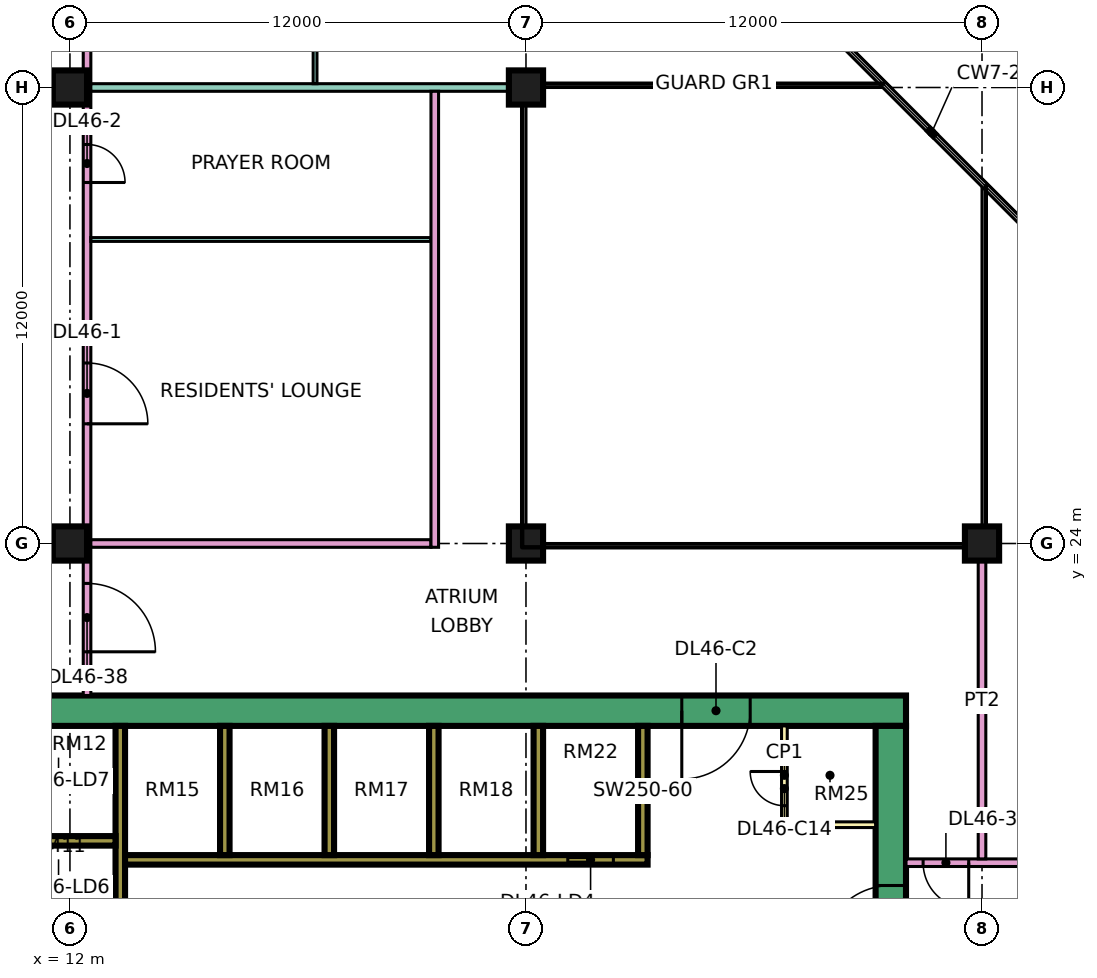
"""IFC4 building model, lengths in metres.
Left out: names, types, materials, properties, quantities, classifications, styles, units other than length and angle.
Written with IfcOpenShell. Run it as: python <this file> out.ifc"""

import sys

from ifc_helpers import new_model, si_unit, direction, frame, frame_2d, origin, origin_2d, place, context, subcontext, project, spatial, rectangle, extrude, element, fill, save


model = new_model("IFC4")
c1 = context("Model", 3, precision=1e-05, world=origin(), true_north=direction((0.0, 1.0)))
c2 = subcontext(c1, "Body", "Model", "MODEL_VIEW")
j1 = project(units=[si_unit("LENGTHUNIT", "METRE"), si_unit("PLANEANGLEUNIT", "RADIAN")], contexts=[c1])
p1 = place(None, origin())
s1 = spatial("IfcSite", under=j1, at=p1, CompositionType="ELEMENT")
p2 = place(p1, origin())
s2 = spatial("IfcBuilding", under=s1, at=p2, CompositionType="ELEMENT")
p3 = place(p2, frame((0.0, 0.0, 198.65)))
s3 = spatial("IfcBuildingStorey", under=s2, at=p3, CompositionType="ELEMENT", Elevation=198.65)
for number, where, z_axis, x_axis in (
    (1, (12.0, 24.0, 0.0), (0.0, 0.0, 1.0), (1.0, 0.0, 0.0)),
    (2, (12.0, 36.0, 0.0), (0.0, 0.0, 1.0), (1.0, 0.0, 0.0)),
    (3, (24.0, 24.0, 0.0), (0.0, 0.0, 1.0), (1.0, 0.0, 0.0)),
    (4, (24.0, 36.0, 0.0), (0.0, 0.0, 1.0), (1.0, 0.0, 0.0)),
    (5, (36.0, 24.0, 0.0), (0.0, 0.0, 1.0), (1.0, 0.0, 0.0)),
):
    element("IfcColumn", number, at=place(p3, frame(where, z_axis=z_axis, x_axis=x_axis)), inside=s3, PredefinedType="COLUMN", context=c2, shape_type="SweptSolid", body=[
        extrude(rectangle(XDim=0.9, YDim=0.9, at=origin_2d()), origin(), (0.0, 0.0, 1.0), 3.75),
    ])
p4 = place(p3, frame((9.0, 19.6, 0.0), z_axis=(0.0, 0.0, 1.0), x_axis=(1.0, 0.0, 0.0)))
e6 = element("IfcWall", 6, at=p4, inside=s3, PredefinedType="SHEAR", context=c2, shape_type="SweptSolid", body=[
    extrude(rectangle(XDim=25.0, YDim=0.8, at=frame_2d((12.5, 0.0))), origin(), (0.0, 0.0, 1.0), 3.75),
])
p5 = place(p4, frame((19.1, 0.0, 0.0)))
e7 = element("IfcOpeningElement", 7, at=p5, cuts=e6, PredefinedType="OPENING", context=c2, shape_type="SweptSolid", body=[
    extrude(rectangle(XDim=1.8, YDim=2.4, at=frame_2d((0.9, 1.2))), frame((0.0, 0.41, 0.0), z_axis=(0.0, -1.0, 0.0), x_axis=(1.0, 0.0, 0.0)), (0.0, 0.0, 1.0), 0.82),
])
p6 = place(p3, frame((33.6, 7.8, 0.0), z_axis=(0.0, 0.0, 1.0), x_axis=(0.0, 1.0, 0.0)))
e8 = element("IfcWall", 8, at=p6, inside=s3, PredefinedType="SHEAR", context=c2, shape_type="SweptSolid", body=[
    extrude(rectangle(XDim=11.4, YDim=0.8, at=frame_2d((5.7, 0.0))), origin(), (0.0, 0.0, 1.0), 3.75),
])
p7 = place(p6, frame((5.4, 0.0, 0.0)))
e9 = element("IfcOpeningElement", 9, at=p7, cuts=e8, PredefinedType="OPENING", context=c2, shape_type="SweptSolid", body=[
    extrude(rectangle(XDim=1.8, YDim=2.4, at=frame_2d((0.9, 1.2))), frame((0.0, 0.41, 0.0), z_axis=(0.0, -1.0, 0.0), x_axis=(1.0, 0.0, 0.0)), (0.0, 0.0, 1.0), 0.82),
])
p8 = place(p3, frame((13.325, 7.8, 0.0), z_axis=(0.0, 0.0, 1.0), x_axis=(0.0, 1.0, 0.0)))
e10 = element("IfcWall", 10, at=p8, inside=s3, PredefinedType="SHEAR", context=c2, shape_type="SweptSolid", body=[
    extrude(rectangle(XDim=11.4, YDim=0.25, at=frame_2d((5.7, 0.0))), origin(), (0.0, 0.0, 1.0), 3.75),
])
p9 = place(p3, frame((13.45, 15.675, 0.0), z_axis=(0.0, 0.0, 1.0), x_axis=(1.0, 0.0, 0.0)))
e11 = element("IfcWall", 11, at=p9, inside=s3, PredefinedType="SHEAR", context=c2, shape_type="SweptSolid", body=[
    extrude(rectangle(XDim=13.75, YDim=0.25, at=frame_2d((6.875, 0.0))), origin(), (0.0, 0.0, 1.0), 3.75),
])
p10 = place(p9, frame((11.65, 0.0, 0.0)))
e12 = element("IfcOpeningElement", 12, at=p10, cuts=e11, PredefinedType="OPENING", context=c2, shape_type="SweptSolid", body=[
    extrude(rectangle(XDim=1.2, YDim=2.2, at=frame_2d((0.6, 1.1))), frame((0.0, 0.135, 0.0), z_axis=(0.0, -1.0, 0.0), x_axis=(1.0, 0.0, 0.0)), (0.0, 0.0, 1.0), 0.27),
])
p11 = place(p3, frame((10.2, 16.175, 0.0), z_axis=(0.0, 0.0, 1.0), x_axis=(1.0, 0.0, 0.0)))
e13 = element("IfcWall", 13, at=p11, inside=s3, PredefinedType="SHEAR", context=c2, shape_type="SweptSolid", body=[
    extrude(rectangle(XDim=3.0, YDim=0.25, at=frame_2d((1.5, 0.0))), origin(), (0.0, 0.0, 1.0), 3.75),
])
for number, where, z_axis, x_axis in (
    (14, (16.075, 15.8, 0.0), (0.0, 0.0, 1.0), (0.0, 1.0, 0.0)),
    (15, (18.825, 15.8, 0.0), (0.0, 0.0, 1.0), (0.0, 1.0, 0.0)),
    (16, (21.575, 15.8, 0.0), (0.0, 0.0, 1.0), (0.0, 1.0, 0.0)),
    (17, (24.325, 15.8, 0.0), (0.0, 0.0, 1.0), (0.0, 1.0, 0.0)),
    (18, (27.075, 15.8, 0.0), (0.0, 0.0, 1.0), (0.0, 1.0, 0.0)),
):
    element("IfcWall", number, at=place(p3, frame(where, z_axis=z_axis, x_axis=x_axis)), inside=s3, PredefinedType="SHEAR", context=c2, shape_type="SweptSolid", body=[
        extrude(rectangle(XDim=3.4, YDim=0.25, at=frame_2d((1.7, 0.0))), origin(), (0.0, 0.0, 1.0), 3.75),
    ])
p12 = place(p3, frame((30.8, 16.6, 0.0), z_axis=(0.0, 0.0, 1.0), x_axis=(0.0, 1.0, 0.0)))
e19 = element("IfcWall", 19, at=p12, inside=s3, PredefinedType="PARTITIONING", context=c2, shape_type="SweptSolid", body=[
    extrude(rectangle(XDim=2.6, YDim=0.15, at=frame_2d((1.3, 0.0))), origin(), (0.0, 0.0, 1.0), 3.35),
])
p13 = place(p12, frame((0.5, 0.0, 0.0)))
e20 = element("IfcOpeningElement", 20, at=p13, cuts=e19, PredefinedType="OPENING", context=c2, shape_type="SweptSolid", body=[
    extrude(rectangle(XDim=0.9, YDim=2.1, at=frame_2d((0.45, 1.05))), frame((0.0, 0.085, 0.0), z_axis=(0.0, -1.0, 0.0), x_axis=(1.0, 0.0, 0.0)), (0.0, 0.0, 1.0), 0.17),
])
p14 = place(p3, frame((30.8, 16.6, 0.0), z_axis=(0.0, 0.0, 1.0), x_axis=(1.0, 0.0, 0.0)))
e21 = element("IfcWall", 21, at=p14, inside=s3, PredefinedType="PARTITIONING", context=c2, shape_type="SweptSolid", body=[
    extrude(rectangle(XDim=2.4, YDim=0.15, at=frame_2d((1.2, 0.0))), origin(), (0.0, 0.0, 1.0), 3.35),
])
p15 = place(p3, frame((12.45, 20.0, 0.0), z_axis=(0.0, 0.0, 1.0), x_axis=(0.0, 1.0, 0.0)))
e22 = element("IfcWall", 22, at=p15, inside=s3, PredefinedType="PARTITIONING", context=c2, shape_type="SweptSolid", body=[
    extrude(rectangle(XDim=42.926, YDim=0.2, at=frame_2d((21.463, 0.0))), origin(), (0.0, 0.0, 1.0), 3.35),
])
p16 = place(p15, frame((7.15, 0.0, 0.0)))
e23 = element("IfcOpeningElement", 23, at=p16, cuts=e22, PredefinedType="OPENING", context=c2, shape_type="SweptSolid", body=[
    extrude(rectangle(XDim=1.6, YDim=2.1, at=frame_2d((0.8, 1.05))), frame((0.0, 0.11, 0.0), z_axis=(0.0, -1.0, 0.0), x_axis=(1.0, 0.0, 0.0)), (0.0, 0.0, 1.0), 0.22),
])
p17 = place(p15, frame((13.5, 0.0, 0.0)))
e24 = element("IfcOpeningElement", 24, at=p17, cuts=e22, PredefinedType="OPENING", context=c2, shape_type="SweptSolid", body=[
    extrude(rectangle(XDim=1.0, YDim=2.1, at=frame_2d((0.5, 1.05))), frame((0.0, 0.11, 0.0), z_axis=(0.0, -1.0, 0.0), x_axis=(1.0, 0.0, 0.0)), (0.0, 0.0, 1.0), 0.22),
])
p18 = place(p15, frame((17.2, 0.0, 0.0)))
e25 = element("IfcOpeningElement", 25, at=p18, cuts=e22, PredefinedType="OPENING", context=c2, shape_type="SweptSolid", body=[
    extrude(rectangle(XDim=1.0, YDim=2.1, at=frame_2d((0.5, 1.05))), frame((0.0, 0.11, 0.0), z_axis=(0.0, -1.0, 0.0), x_axis=(1.0, 0.0, 0.0)), (0.0, 0.0, 1.0), 0.22),
])
p19 = place(p15, frame((35.2, 0.0, 0.0)))
e26 = element("IfcOpeningElement", 26, at=p19, cuts=e22, PredefinedType="OPENING", context=c2, shape_type="SweptSolid", body=[
    extrude(rectangle(XDim=1.0, YDim=2.1, at=frame_2d((0.5, 1.05))), frame((0.0, 0.11, 0.0), z_axis=(0.0, -1.0, 0.0), x_axis=(1.0, 0.0, 0.0)), (0.0, 0.0, 1.0), 0.22),
])
p20 = place(p15, frame((1.15, 0.0, 0.0)))
e27 = element("IfcOpeningElement", 27, at=p20, cuts=e22, PredefinedType="OPENING", context=c2, shape_type="SweptSolid", body=[
    extrude(rectangle(XDim=1.8, YDim=2.1, at=frame_2d((0.9, 1.05))), frame((0.0, 0.11, 0.0), z_axis=(0.0, -1.0, 0.0), x_axis=(1.0, 0.0, 0.0)), (0.0, 0.0, 1.0), 0.22),
])
p21 = place(p15, frame((28.6, 0.0, 0.0)))
e28 = element("IfcOpeningElement", 28, at=p21, cuts=e22, PredefinedType="OPENING", context=c2, shape_type="SweptSolid", body=[
    extrude(rectangle(XDim=1.8, YDim=2.1, at=frame_2d((0.9, 1.05))), frame((0.0, 0.11, 0.0), z_axis=(0.0, -1.0, 0.0), x_axis=(1.0, 0.0, 0.0)), (0.0, 0.0, 1.0), 0.22),
])
p22 = place(p3, frame((12.55, 24.0, 0.0), z_axis=(0.0, 0.0, 1.0), x_axis=(1.0, 0.0, 0.0)))
e29 = element("IfcWall", 29, at=p22, inside=s3, PredefinedType="PARTITIONING", context=c2, shape_type="SweptSolid", body=[
    extrude(rectangle(XDim=8.95, YDim=0.2, at=frame_2d((4.475, 0.0))), origin(), (0.0, 0.0, 1.0), 3.35),
])
p23 = place(p3, frame((12.55, 32.0, 0.0), z_axis=(0.0, 0.0, 1.0), x_axis=(1.0, 0.0, 0.0)))
e30 = element("IfcWall", 30, at=p23, inside=s3, PredefinedType="PARTITIONING", context=c2, shape_type="SweptSolid", body=[
    extrude(rectangle(XDim=8.95, YDim=0.1, at=frame_2d((4.475, 0.0))), origin(), (0.0, 0.0, 1.0), 3.35),
])
p24 = place(p3, frame((12.55, 36.0, 0.0), z_axis=(0.0, 0.0, 1.0), x_axis=(1.0, 0.0, 0.0)))
e31 = element("IfcWall", 31, at=p24, inside=s3, PredefinedType="PARTITIONING", context=c2, shape_type="SweptSolid", body=[
    extrude(rectangle(XDim=11.45, YDim=0.2, at=frame_2d((5.725, 0.0))), origin(), (0.0, 0.0, 1.0), 3.35),
])
p25 = place(p3, frame((18.45, 36.1, 0.0), z_axis=(0.0, 0.0, 1.0), x_axis=(0.0, 1.0, 0.0)))
e32 = element("IfcWall", 32, at=p25, inside=s3, PredefinedType="PARTITIONING", context=c2, shape_type="SweptSolid", body=[
    extrude(rectangle(XDim=5.95, YDim=0.1, at=frame_2d((2.975, 0.0))), origin(), (0.0, 0.0, 1.0), 3.35),
])
p26 = place(p25, frame((0.95, 0.0, 0.0)))
e33 = element("IfcOpeningElement", 33, at=p26, cuts=e32, PredefinedType="OPENING", context=c2, shape_type="SweptSolid", body=[
    extrude(rectangle(XDim=0.9, YDim=2.1, at=frame_2d((0.45, 1.05))), frame((0.0, 0.06, 0.0), z_axis=(0.0, -1.0, 0.0), x_axis=(1.0, 0.0, 0.0)), (0.0, 0.0, 1.0), 0.12),
])
p27 = place(p25, frame((3.95, 0.0, 0.0)))
e34 = element("IfcOpeningElement", 34, at=p27, cuts=e32, PredefinedType="OPENING", context=c2, shape_type="SweptSolid", body=[
    extrude(rectangle(XDim=0.9, YDim=2.1, at=frame_2d((0.45, 1.05))), frame((0.0, 0.06, 0.0), z_axis=(0.0, -1.0, 0.0), x_axis=(1.0, 0.0, 0.0)), (0.0, 0.0, 1.0), 0.12),
])
p28 = place(p3, frame((21.6, 23.9, 0.0), z_axis=(0.0, 0.0, 1.0), x_axis=(0.0, 1.0, 0.0)))
e35 = element("IfcWall", 35, at=p28, inside=s3, PredefinedType="PARTITIONING", context=c2, shape_type="SweptSolid", body=[
    extrude(rectangle(XDim=12.0, YDim=0.2, at=frame_2d((6.0, 0.0))), origin(), (0.0, 0.0, 1.0), 3.35),
])
p29 = place(p3, frame((34.0, 15.6, 0.0), z_axis=(0.0, 0.0, 1.0), x_axis=(1.0, 0.0, 0.0)))
e36 = element("IfcWall", 36, at=p29, inside=s3, PredefinedType="PARTITIONING", context=c2, shape_type="SweptSolid", body=[
    extrude(rectangle(XDim=10.35, YDim=0.2, at=frame_2d((5.175, 0.0))), origin(), (0.0, 0.0, 1.0), 3.35),
])
p30 = place(p29, frame((5.6, 0.0, 0.0)))
e37 = element("IfcOpeningElement", 37, at=p30, cuts=e36, PredefinedType="OPENING", context=c2, shape_type="SweptSolid", body=[
    extrude(rectangle(XDim=1.0, YDim=2.1, at=frame_2d((0.5, 1.05))), frame((0.0, 0.11, 0.0), z_axis=(0.0, -1.0, 0.0), x_axis=(1.0, 0.0, 0.0)), (0.0, 0.0, 1.0), 0.22),
])
p31 = place(p29, frame((0.45, 0.0, 0.0)))
e38 = element("IfcOpeningElement", 38, at=p31, cuts=e36, PredefinedType="OPENING", context=c2, shape_type="SweptSolid", body=[
    extrude(rectangle(XDim=1.2, YDim=2.1, at=frame_2d((0.6, 1.05))), frame((0.0, 0.11, 0.0), z_axis=(0.0, -1.0, 0.0), x_axis=(1.0, 0.0, 0.0)), (0.0, 0.0, 1.0), 0.22),
])
p32 = place(p3, frame((36.0, 15.7, 0.0), z_axis=(0.0, 0.0, 1.0), x_axis=(0.0, 1.0, 0.0)))
e39 = element("IfcWall", 39, at=p32, inside=s3, PredefinedType="PARTITIONING", context=c2, shape_type="SweptSolid", body=[
    extrude(rectangle(XDim=8.3, YDim=0.2, at=frame_2d((4.15, 0.0))), origin(), (0.0, 0.0, 1.0), 3.35),
])
p33 = place(p10, origin())
e40 = element("IfcDoor", 40, at=p33, inside=s3, OperationType="DOUBLE_DOOR_SLIDING", PredefinedType="DOOR", context=c2, shape_type="SweptSolid", body=[
    extrude(rectangle(XDim=1.2, YDim=2.2, at=frame_2d((0.6, 1.1))), frame((0.0, 0.025, 0.0), z_axis=(0.0, -1.0, 0.0), x_axis=(1.0, 0.0, 0.0)), (0.0, 0.0, 1.0), 0.05),
])
fill(e12, e40)
p34 = place(p7, origin())
e41 = element("IfcDoor", 41, at=p34, inside=s3, OperationType="DOUBLE_DOOR_SINGLE_SWING", PredefinedType="DOOR", context=c2, shape_type="SweptSolid", body=[
    extrude(rectangle(XDim=1.8, YDim=2.4, at=frame_2d((0.9, 1.2))), frame((0.0, 0.025, 0.0), z_axis=(0.0, -1.0, 0.0), x_axis=(1.0, 0.0, 0.0)), (0.0, 0.0, 1.0), 0.05),
])
fill(e9, e41)
p35 = place(p5, frame((1.8, 0.0, 0.0), z_axis=(0.0, 0.0, 1.0), x_axis=(-1.0, 0.0, 0.0)))
e42 = element("IfcDoor", 42, at=p35, inside=s3, OperationType="DOUBLE_DOOR_SINGLE_SWING", PredefinedType="DOOR", context=c2, shape_type="SweptSolid", body=[
    extrude(rectangle(XDim=1.8, YDim=2.4, at=frame_2d((0.9, 1.2))), frame((0.0, 0.025, 0.0), z_axis=(0.0, -1.0, 0.0), x_axis=(1.0, 0.0, 0.0)), (0.0, 0.0, 1.0), 0.05),
])
fill(e7, e42)
p36 = place(p13, frame((0.9, 0.0, 0.0), z_axis=(0.0, 0.0, 1.0), x_axis=(-1.0, 0.0, 0.0)))
e43 = element("IfcDoor", 43, at=p36, inside=s3, OperationType="SINGLE_SWING_RIGHT", PredefinedType="DOOR", context=c2, shape_type="SweptSolid", body=[
    extrude(rectangle(XDim=0.9, YDim=2.1, at=frame_2d((0.45, 1.05))), frame((0.0, 0.025, 0.0), z_axis=(0.0, -1.0, 0.0), x_axis=(1.0, 0.0, 0.0)), (0.0, 0.0, 1.0), 0.05),
])
fill(e20, e43)
p37 = place(p16, frame((1.6, 0.0, 0.0), z_axis=(0.0, 0.0, 1.0), x_axis=(-1.0, 0.0, 0.0)))
e44 = element("IfcDoor", 44, at=p37, inside=s3, OperationType="DOUBLE_DOOR_SINGLE_SWING", PredefinedType="DOOR", context=c2, shape_type="SweptSolid", body=[
    extrude(rectangle(XDim=1.6, YDim=2.1, at=frame_2d((0.8, 1.05))), frame((0.0, 0.025, 0.0), z_axis=(0.0, -1.0, 0.0), x_axis=(1.0, 0.0, 0.0)), (0.0, 0.0, 1.0), 0.05),
])
fill(e23, e44)
p38 = place(p17, frame((1.0, 0.0, 0.0), z_axis=(0.0, 0.0, 1.0), x_axis=(-1.0, 0.0, 0.0)))
e45 = element("IfcDoor", 45, at=p38, inside=s3, OperationType="SINGLE_SWING_LEFT", PredefinedType="DOOR", context=c2, shape_type="SweptSolid", body=[
    extrude(rectangle(XDim=1.0, YDim=2.1, at=frame_2d((0.5, 1.05))), frame((0.0, 0.025, 0.0), z_axis=(0.0, -1.0, 0.0), x_axis=(1.0, 0.0, 0.0)), (0.0, 0.0, 1.0), 0.05),
])
fill(e24, e45)
p39 = place(p31, origin())
e46 = element("IfcDoor", 46, at=p39, inside=s3, OperationType="SINGLE_SWING_RIGHT", PredefinedType="DOOR", context=c2, shape_type="SweptSolid", body=[
    extrude(rectangle(XDim=1.2, YDim=2.1, at=frame_2d((0.6, 1.05))), frame((0.0, 0.025, 0.0), z_axis=(0.0, -1.0, 0.0), x_axis=(1.0, 0.0, 0.0)), (0.0, 0.0, 1.0), 0.05),
])
fill(e38, e46)
p40 = place(p20, frame((1.8, 0.0, 0.0), z_axis=(0.0, 0.0, 1.0), x_axis=(-1.0, 0.0, 0.0)))
e47 = element("IfcDoor", 47, at=p40, inside=s3, OperationType="DOUBLE_DOOR_SINGLE_SWING", PredefinedType="DOOR", context=c2, shape_type="SweptSolid", body=[
    extrude(rectangle(XDim=1.8, YDim=2.1, at=frame_2d((0.9, 1.05))), frame((0.0, 0.025, 0.0), z_axis=(0.0, -1.0, 0.0), x_axis=(1.0, 0.0, 0.0)), (0.0, 0.0, 1.0), 0.05),
])
fill(e27, e47)
save(model, sys.argv[1])
